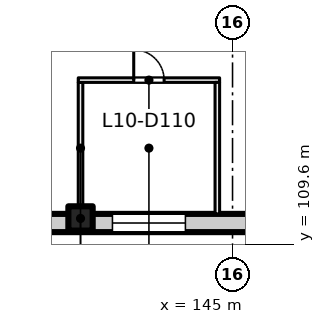
"""IFC4 building model, lengths in metres.
Left out: names, types, materials, properties, quantities, classifications, styles, units other than length and angle.
Written with IfcOpenShell. Run it as: python <this file> out.ifc"""

import sys

from ifc_helpers import new_model, si_unit, direction, frame, frame_2d, origin, origin_2d, place, context, subcontext, project, spatial, rectangle, extrude, element, fill, save


model = new_model("IFC4")
c1 = context("Model", 3, precision=1e-05, world=origin(), true_north=direction((0.0, 1.0)))
c2 = subcontext(c1, "Body", "Model", "MODEL_VIEW")
j1 = project(units=[si_unit("LENGTHUNIT", "METRE"), si_unit("PLANEANGLEUNIT", "RADIAN")], contexts=[c1])
p1 = place(None, origin())
s1 = spatial("IfcSite", under=j1, at=p1, CompositionType="ELEMENT")
p2 = place(p1, origin())
s2 = spatial("IfcBuilding", under=s1, at=p2, CompositionType="ELEMENT")
p3 = place(p2, frame((0.0, 0.0, 47.5)))
s3 = spatial("IfcBuildingStorey", under=s2, at=p3, CompositionType="ELEMENT", Elevation=47.5)
p4 = place(p3, frame((140.0, 110.45, 0.0), z_axis=(0.0, 0.0, 1.0), x_axis=(1.0, 0.0, 0.0)))
e1 = element("IfcColumn", 1, at=p4, inside=s3, PredefinedType="COLUMN", context=c2, shape_type="SweptSolid", body=[
    extrude(rectangle(XDim=0.8, YDim=0.8, at=origin_2d()), origin(), (0.0, 0.0, 1.0), 4.0),
])
p5 = place(p3, frame((162.93, 110.3, 0.0), z_axis=(0.0, 0.0, 1.0), x_axis=(-1.0, 0.0, 0.0)))
e2 = element("IfcWall", 2, at=p5, inside=s3, PredefinedType="SOLIDWALL", context=c2, shape_type="SweptSolid", body=[
    extrude(rectangle(XDim=31.93, YDim=0.6, at=frame_2d((15.965, 0.0))), origin(), (0.0, 0.0, 1.0), 3.625),
])
p6 = place(p5, frame((1.48, 0.0, 0.9)))
e3 = element("IfcOpeningElement", 3, at=p6, cuts=e2, PredefinedType="OPENING", context=c2, shape_type="SweptSolid", body=[
    extrude(rectangle(XDim=2.4, YDim=2.4, at=frame_2d((1.2, 1.2))), frame((0.0, 0.31, 0.0), z_axis=(0.0, -1.0, 0.0), x_axis=(1.0, 0.0, 0.0)), (0.0, 0.0, 1.0), 0.62),
])
p7 = place(p5, frame((5.98, 0.0, 0.9)))
e4 = element("IfcOpeningElement", 4, at=p7, cuts=e2, PredefinedType="OPENING", context=c2, shape_type="SweptSolid", body=[
    extrude(rectangle(XDim=2.4, YDim=2.4, at=frame_2d((1.2, 1.2))), frame((0.0, 0.31, 0.0), z_axis=(0.0, -1.0, 0.0), x_axis=(1.0, 0.0, 0.0)), (0.0, 0.0, 1.0), 0.62),
])
p8 = place(p5, frame((10.48, 0.0, 0.9)))
e5 = element("IfcOpeningElement", 5, at=p8, cuts=e2, PredefinedType="OPENING", context=c2, shape_type="SweptSolid", body=[
    extrude(rectangle(XDim=2.4, YDim=2.4, at=frame_2d((1.2, 1.2))), frame((0.0, 0.31, 0.0), z_axis=(0.0, -1.0, 0.0), x_axis=(1.0, 0.0, 0.0)), (0.0, 0.0, 1.0), 0.62),
])
p9 = place(p5, frame((14.98, 0.0, 0.9)))
e6 = element("IfcOpeningElement", 6, at=p9, cuts=e2, PredefinedType="OPENING", context=c2, shape_type="SweptSolid", body=[
    extrude(rectangle(XDim=2.4, YDim=2.4, at=frame_2d((1.2, 1.2))), frame((0.0, 0.31, 0.0), z_axis=(0.0, -1.0, 0.0), x_axis=(1.0, 0.0, 0.0)), (0.0, 0.0, 1.0), 0.62),
])
p10 = place(p5, frame((19.48, 0.0, 0.9)))
e7 = element("IfcOpeningElement", 7, at=p10, cuts=e2, PredefinedType="OPENING", context=c2, shape_type="SweptSolid", body=[
    extrude(rectangle(XDim=2.4, YDim=2.4, at=frame_2d((1.2, 1.2))), frame((0.0, 0.31, 0.0), z_axis=(0.0, -1.0, 0.0), x_axis=(1.0, 0.0, 0.0)), (0.0, 0.0, 1.0), 0.62),
])
p11 = place(p5, frame((23.98, 0.0, 0.9)))
e8 = element("IfcOpeningElement", 8, at=p11, cuts=e2, PredefinedType="OPENING", context=c2, shape_type="SweptSolid", body=[
    extrude(rectangle(XDim=2.4, YDim=2.4, at=frame_2d((1.2, 1.2))), frame((0.0, 0.31, 0.0), z_axis=(0.0, -1.0, 0.0), x_axis=(1.0, 0.0, 0.0)), (0.0, 0.0, 1.0), 0.62),
])
p12 = place(p5, frame((28.48, 0.0, 0.9)))
e9 = element("IfcOpeningElement", 9, at=p12, cuts=e2, PredefinedType="OPENING", context=c2, shape_type="SweptSolid", body=[
    extrude(rectangle(XDim=2.4, YDim=2.4, at=frame_2d((1.2, 1.2))), frame((0.0, 0.31, 0.0), z_axis=(0.0, -1.0, 0.0), x_axis=(1.0, 0.0, 0.0)), (0.0, 0.0, 1.0), 0.62),
])
p13 = place(p3, frame((140.0, 110.6, 0.0), z_axis=(0.0, 0.0, 1.0), x_axis=(0.0, 1.0, 0.0)))
e10 = element("IfcWall", 10, at=p13, inside=s3, PredefinedType="PARTITIONING", context=c2, shape_type="SweptSolid", body=[
    extrude(rectangle(XDim=4.325, YDim=0.15, at=frame_2d((2.163, 0.0))), origin(), (0.0, 0.0, 1.0), 3.625),
])
p14 = place(p3, frame((139.925, 115.0, 0.0), z_axis=(0.0, 0.0, 1.0), x_axis=(1.0, 0.0, 0.0)))
e11 = element("IfcWall", 11, at=p14, inside=s3, PredefinedType="PARTITIONING", context=c2, shape_type="SweptSolid", body=[
    extrude(rectangle(XDim=4.65, YDim=0.15, at=frame_2d((2.325, 0.0))), origin(), (0.0, 0.0, 1.0), 3.625),
])
p15 = place(p14, frame((1.825, 0.0, 0.0)))
e12 = element("IfcOpeningElement", 12, at=p15, cuts=e11, PredefinedType="OPENING", context=c2, shape_type="SweptSolid", body=[
    extrude(rectangle(XDim=1.0, YDim=2.1, at=frame_2d((0.5, 1.05))), frame((0.0, 0.085, 0.0), z_axis=(0.0, -1.0, 0.0), x_axis=(1.0, 0.0, 0.0)), (0.0, 0.0, 1.0), 0.17),
])
p16 = place(p3, frame((144.5, 114.925, 0.0), z_axis=(0.0, 0.0, 1.0), x_axis=(0.0, -1.0, 0.0)))
e13 = element("IfcWall", 13, at=p16, inside=s3, PredefinedType="PARTITIONING", context=c2, shape_type="SweptSolid", body=[
    extrude(rectangle(XDim=4.325, YDim=0.15, at=frame_2d((2.163, 0.0))), origin(), (0.0, 0.0, 1.0), 3.625),
])
p17 = place(p10, origin())
e14 = element("IfcWindow", 14, at=p17, inside=s3, PartitioningType="SINGLE_PANEL", PredefinedType="WINDOW", context=c2, shape_type="SweptSolid", body=[
    extrude(rectangle(XDim=2.4, YDim=2.4, at=frame_2d((1.2, 1.2))), frame((0.0, 0.03, 0.0), z_axis=(0.0, -1.0, 0.0), x_axis=(1.0, 0.0, 0.0)), (0.0, 0.0, 1.0), 0.06),
])
fill(e7, e14)
p18 = place(p15, origin())
e15 = element("IfcDoor", 15, at=p18, inside=s3, OperationType="SINGLE_SWING_LEFT", PredefinedType="DOOR", context=c2, shape_type="SweptSolid", body=[
    extrude(rectangle(XDim=1.0, YDim=2.1, at=frame_2d((0.5, 1.05))), frame((0.0, 0.025, 0.0), z_axis=(0.0, -1.0, 0.0), x_axis=(1.0, 0.0, 0.0)), (0.0, 0.0, 1.0), 0.05),
])
fill(e12, e15)
save(model, sys.argv[1])
